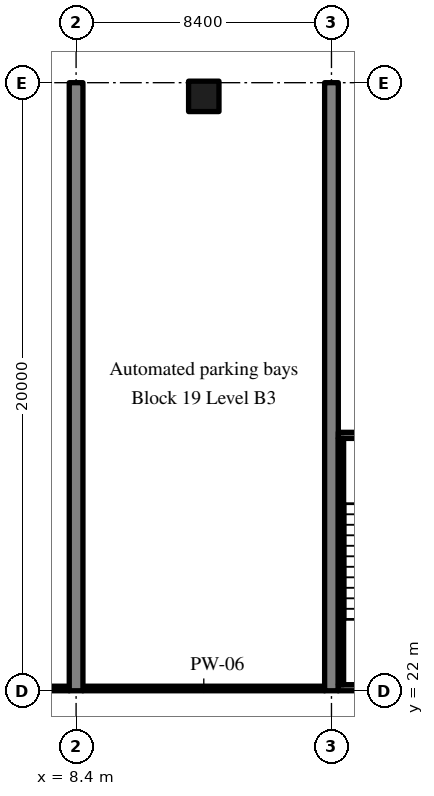
"""IFC4 building model, lengths in metres.
Left out: names, types, materials, properties, quantities, classifications, styles, units other than length and angle.
Written with IfcOpenShell. Run it as: python <this file> out.ifc"""

import sys

from ifc_helpers import new_model, si_unit, direction, frame, frame_2d, origin, origin_2d, place, context, subcontext, project, spatial, rectangle, extrude, source, transform, mapped, element, save


model = new_model("IFC4")
c1 = context("Model", 3, precision=1e-05, world=origin(), true_north=direction((0.0, 1.0)))
c2 = subcontext(c1, "Body", "Model", "MODEL_VIEW")
j1 = project(units=[si_unit("LENGTHUNIT", "METRE"), si_unit("PLANEANGLEUNIT", "RADIAN")], contexts=[c1])
p1 = place(None, origin())
s1 = spatial("IfcSite", under=j1, at=p1, CompositionType="ELEMENT")
p2 = place(p1, origin())
s2 = spatial("IfcBuilding", under=s1, at=p2, CompositionType="ELEMENT")
p3 = place(p2, frame((0.0, 0.0, -13.5)))
s3 = spatial("IfcBuildingStorey", under=s2, at=p3, CompositionType="ELEMENT", Elevation=-13.5)
m1 = source(origin(), c2, "Body", "SweptSolid", [
    extrude(rectangle(XDim=20.0, YDim=0.45, at=frame_2d((10.0, 0.0))), origin(), (0.0, 0.0, 1.0), 4.52),
])
for number, where, z_axis, x_axis in (
    (1, (8.4, 22.0, -0.3), (0.0, 0.0, 1.0), (0.0, 1.0, 0.0)),
    (2, (16.8, 22.0, -0.3), (0.0, 0.0, 1.0), (0.0, 1.0, 0.0)),
):
    element("IfcWall", number, at=place(p3, frame(where, z_axis=z_axis, x_axis=x_axis)), inside=s3, PredefinedType="SHEAR", context=c2, shape_type="MappedRepresentation", body=[
        mapped(m1, transform((0.0, 0.0, 0.0), scale=1.0)),
    ])
m2 = source(origin(), c2, "Body", "SweptSolid", [
    extrude(rectangle(XDim=1.0, YDim=1.0, at=origin_2d()), origin(), (0.0, 0.0, 1.0), 4.52),
])
p4 = place(p3, frame((12.6, 41.55, -0.3), z_axis=(0.0, 0.0, 1.0), x_axis=(1.0, 0.0, 0.0)))
e3 = element("IfcColumn", 3, at=p4, inside=s3, PredefinedType="COLUMN", context=c2, shape_type="MappedRepresentation", body=[
    mapped(m2, transform((0.0, 0.0, 0.0), scale=1.0)),
])
m3 = source(origin(), c2, "Body", "SweptSolid", [
    extrude(rectangle(XDim=8.175, YDim=0.2, at=frame_2d((4.087, 0.0))), origin(), (0.0, 0.0, 1.0), 4.52),
])
p5 = place(p3, frame((17.025, 22.1, -0.3), z_axis=(0.0, 0.0, 1.0), x_axis=(1.0, 0.0, 0.0)))
e4 = element("IfcWall", 4, at=p5, inside=s3, PredefinedType="SOLIDWALL", context=c2, shape_type="MappedRepresentation", body=[
    mapped(m3, transform((0.0, 0.0, 0.0), scale=1.0)),
])
m4 = source(origin(), c2, "Body", "SweptSolid", [
    extrude(rectangle(XDim=1.2, YDim=2.1, at=frame_2d((0.6, 1.05))), frame((0.0, 0.11, 0.0), z_axis=(0.0, -1.0, 0.0), x_axis=(1.0, 0.0, 0.0)), (0.0, 0.0, 1.0), 0.22),
])
p6 = place(p5, frame((5.975, 0.0, 0.0)))
e5 = element("IfcOpeningElement", 5, at=p6, cuts=e4, PredefinedType="OPENING", context=c2, shape_type="MappedRepresentation", body=[
    mapped(m4, transform((0.0, 0.0, 0.0), scale=1.0)),
])
p7 = place(p3, frame((17.025, 30.4, -0.3), z_axis=(0.0, 0.0, 1.0), x_axis=(1.0, 0.0, 0.0)))
e6 = element("IfcWall", 6, at=p7, inside=s3, PredefinedType="SOLIDWALL", context=c2, shape_type="MappedRepresentation", body=[
    mapped(m3, transform((0.0, 0.0, 0.0), scale=1.0)),
])
m5 = source(origin(), c2, "Body", "SweptSolid", [
    extrude(rectangle(XDim=1.0, YDim=2.1, at=frame_2d((0.5, 1.05))), frame((0.0, 0.11, 0.0), z_axis=(0.0, -1.0, 0.0), x_axis=(1.0, 0.0, 0.0)), (0.0, 0.0, 1.0), 0.22),
])
p8 = place(p7, frame((6.075, 0.0, 0.0)))
e7 = element("IfcOpeningElement", 7, at=p8, cuts=e6, PredefinedType="OPENING", context=c2, shape_type="MappedRepresentation", body=[
    mapped(m5, transform((0.0, 0.0, 0.0), scale=1.0)),
])
m6 = source(origin(), c2, "Body", "SweptSolid", [
    extrude(rectangle(XDim=8.1, YDim=0.175, at=frame_2d((4.05, 0.0))), origin(), (0.0, 0.0, 1.0), 4.52),
])
p9 = place(p3, frame((17.112, 22.2, -0.3), z_axis=(0.0, 0.0, 1.0), x_axis=(0.0, 1.0, 0.0)))
e8 = element("IfcWall", 8, at=p9, inside=s3, PredefinedType="SOLIDWALL", context=c2, shape_type="MappedRepresentation", body=[
    mapped(m6, transform((0.0, 0.0, 0.0), scale=1.0)),
])
m7 = source(origin(), c2, "Body", "SweptSolid", [
    extrude(rectangle(XDim=7.725, YDim=0.15, at=frame_2d((3.863, 0.0))), origin(), (0.0, 0.0, 1.0), 4.22),
])
p10 = place(p3, frame((0.45, 22.075, 0.0), z_axis=(0.0, 0.0, 1.0), x_axis=(1.0, 0.0, 0.0)))
e9 = element("IfcWall", 9, at=p10, inside=s3, PredefinedType="PARTITIONING", context=c2, shape_type="MappedRepresentation", body=[
    mapped(m7, transform((0.0, 0.0, 0.0), scale=1.0)),
])
m8 = source(origin(), c2, "Body", "SweptSolid", [
    extrude(rectangle(XDim=7.95, YDim=0.15, at=frame_2d((3.975, 0.0))), origin(), (0.0, 0.0, 1.0), 4.22),
])
p11 = place(p3, frame((8.625, 22.075, 0.0), z_axis=(0.0, 0.0, 1.0), x_axis=(1.0, 0.0, 0.0)))
e10 = element("IfcWall", 10, at=p11, inside=s3, PredefinedType="PARTITIONING", context=c2, shape_type="MappedRepresentation", body=[
    mapped(m8, transform((0.0, 0.0, 0.0), scale=1.0)),
])
save(model, sys.argv[1])
